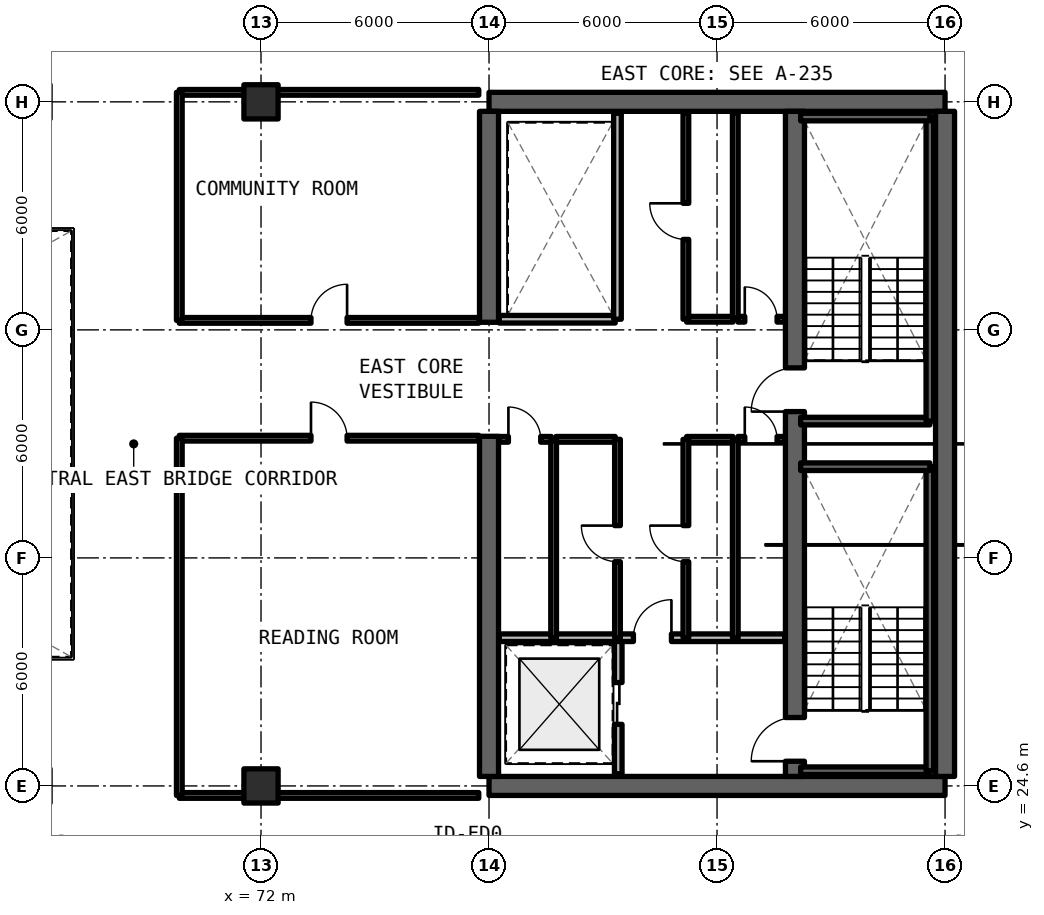
"""IFC4 building model, lengths in metres.
Left out: names, types, materials, properties, quantities, classifications, styles, units other than length and angle.
Written with IfcOpenShell. Run it as: python <this file> out.ifc"""

import sys

from ifc_helpers import new_model, si_unit, direction, frame, frame_2d, origin, origin_2d, place, context, subcontext, project, spatial, rectangle, extrude, element, fill, save


model = new_model("IFC4")
c1 = context("Model", 3, precision=1e-05, world=origin(), true_north=direction((0.0, 1.0)))
c2 = subcontext(c1, "Body", "Model", "MODEL_VIEW")
j1 = project(units=[si_unit("LENGTHUNIT", "METRE"), si_unit("PLANEANGLEUNIT", "RADIAN")], contexts=[c1])
p1 = place(None, origin())
s1 = spatial("IfcSite", under=j1, at=p1, CompositionType="ELEMENT")
p2 = place(p1, origin())
s2 = spatial("IfcBuilding", under=s1, at=p2, CompositionType="ELEMENT")
p3 = place(p2, frame((0.0, 0.0, 151.8)))
s3 = spatial("IfcBuildingStorey", under=s2, at=p3, CompositionType="ELEMENT", Elevation=151.8)
for number, where, z_axis, x_axis in (
    (1, (78.0, 24.6, 0.0), (0.0, 0.0, 1.0), (1.0, 0.0, 0.0)),
    (2, (90.0, 42.6, 0.0), (0.0, 0.0, 1.0), (-1.0, 0.0, 0.0)),
):
    element("IfcWall", number, at=place(p3, frame(where, z_axis=z_axis, x_axis=x_axis)), inside=s3, PredefinedType="SHEAR", context=c2, shape_type="SweptSolid", body=[
        extrude(rectangle(XDim=12.0, YDim=0.5, at=frame_2d((6.0, 0.0))), origin(), (0.0, 0.0, 1.0), 3.3),
    ])
p4 = place(p3, frame((90.0, 24.85, 0.0), z_axis=(0.0, 0.0, 1.0), x_axis=(0.0, 1.0, 0.0)))
e3 = element("IfcWall", 3, at=p4, inside=s3, PredefinedType="SHEAR", context=c2, shape_type="SweptSolid", body=[
    extrude(rectangle(XDim=17.5, YDim=0.5, at=frame_2d((8.75, 0.0))), origin(), (0.0, 0.0, 1.0), 3.3),
])
p5 = place(p3, frame((78.0, 24.85, 0.0), z_axis=(0.0, 0.0, 1.0), x_axis=(0.0, 1.0, 0.0)))
e4 = element("IfcWall", 4, at=p5, inside=s3, PredefinedType="SHEAR", context=c2, shape_type="SweptSolid", body=[
    extrude(rectangle(XDim=8.95, YDim=0.5, at=frame_2d((4.475, 0.0))), origin(), (0.0, 0.0, 1.0), 3.3),
])
p6 = place(p3, frame((78.0, 36.8, 0.0), z_axis=(0.0, 0.0, 1.0), x_axis=(0.0, 1.0, 0.0)))
e5 = element("IfcWall", 5, at=p6, inside=s3, PredefinedType="SHEAR", context=c2, shape_type="SweptSolid", body=[
    extrude(rectangle(XDim=5.55, YDim=0.5, at=frame_2d((2.775, 0.0))), origin(), (0.0, 0.0, 1.0), 3.3),
])
p7 = place(p3, frame((86.05, 24.85, 0.0), z_axis=(0.0, 0.0, 1.0), x_axis=(0.0, 1.0, 0.0)))
e6 = element("IfcWall", 6, at=p7, inside=s3, PredefinedType="SHEAR", context=c2, shape_type="SweptSolid", body=[
    extrude(rectangle(XDim=17.5, YDim=0.5, at=frame_2d((8.75, 0.0))), origin(), (0.0, 0.0, 1.0), 3.3),
])
p8 = place(p7, frame((0.4, 0.0, 0.0)))
e7 = element("IfcOpeningElement", 7, at=p8, cuts=e6, PredefinedType="OPENING", context=c2, shape_type="SweptSolid", body=[
    extrude(rectangle(XDim=1.15, YDim=2.15, at=frame_2d((0.575, 1.075))), frame((0.0, 0.26, 0.0), z_axis=(0.0, -1.0, 0.0), x_axis=(1.0, 0.0, 0.0)), (0.0, 0.0, 1.0), 0.52),
])
p9 = place(p7, frame((9.6, 0.0, 0.0)))
e8 = element("IfcOpeningElement", 8, at=p9, cuts=e6, PredefinedType="OPENING", context=c2, shape_type="SweptSolid", body=[
    extrude(rectangle(XDim=1.15, YDim=2.15, at=frame_2d((0.575, 1.075))), frame((0.0, 0.26, 0.0), z_axis=(0.0, -1.0, 0.0), x_axis=(1.0, 0.0, 0.0)), (0.0, 0.0, 1.0), 0.52),
])
for number, where, z_axis, x_axis in (
    (9, (72.0, 24.6, 0.0), (0.0, 0.0, 1.0), (1.0, 0.0, 0.0)),
    (10, (72.0, 42.6, 0.0), (0.0, 0.0, 1.0), (1.0, 0.0, 0.0)),
):
    element("IfcColumn", number, at=place(p3, frame(where, z_axis=z_axis, x_axis=x_axis)), inside=s3, PredefinedType="COLUMN", context=c2, shape_type="SweptSolid", body=[
        extrude(rectangle(XDim=0.9, YDim=0.9, at=origin_2d()), origin(), (0.0, 0.0, 1.0), 3.3),
    ])
p10 = place(p3, frame((81.4, 24.92, 0.0), z_axis=(0.0, 0.0, 1.0), x_axis=(0.0, 1.0, 0.0)))
e11 = element("IfcWall", 11, at=p10, inside=s3, PredefinedType="SOLIDWALL", context=c2, shape_type="SweptSolid", body=[
    extrude(rectangle(XDim=3.58, YDim=0.2, at=frame_2d((1.79, 0.0))), origin(), (0.0, 0.0, 1.0), 2.35),
])
p11 = place(p10, frame((1.3, 0.0, 0.0)))
e12 = element("IfcOpeningElement", 12, at=p11, cuts=e11, PredefinedType="OPENING", context=c2, shape_type="SweptSolid", body=[
    extrude(rectangle(XDim=1.1, YDim=2.2, at=frame_2d((0.55, 1.1))), frame((0.0, 0.11, 0.0), z_axis=(0.0, -1.0, 0.0), x_axis=(1.0, 0.0, 0.0)), (0.0, 0.0, 1.0), 0.22),
])
p12 = place(p3, frame((78.27, 28.5, 0.0), z_axis=(0.0, 0.0, 1.0), x_axis=(1.0, 0.0, 0.0)))
e13 = element("IfcWall", 13, at=p12, inside=s3, PredefinedType="SOLIDWALL", context=c2, shape_type="SweptSolid", body=[
    extrude(rectangle(XDim=7.51, YDim=0.2, at=frame_2d((3.755, 0.0))), origin(), (0.0, 0.0, 1.0), 2.35),
])
p13 = place(p12, frame((3.53, 0.0, 0.0)))
e14 = element("IfcOpeningElement", 14, at=p13, cuts=e13, PredefinedType="OPENING", context=c2, shape_type="SweptSolid", body=[
    extrude(rectangle(XDim=1.0, YDim=2.15, at=frame_2d((0.5, 1.075))), frame((0.0, 0.11, 0.0), z_axis=(0.0, -1.0, 0.0), x_axis=(1.0, 0.0, 0.0)), (0.0, 0.0, 1.0), 0.22),
])
p14 = place(p3, frame((84.48, 28.5, 0.0), z_axis=(0.0, 0.0, 1.0), x_axis=(0.0, 1.0, 0.0)))
e15 = element("IfcWall", 15, at=p14, inside=s3, PredefinedType="SOLIDWALL", context=c2, shape_type="SweptSolid", body=[
    extrude(rectangle(XDim=5.22, YDim=0.15, at=frame_2d((2.61, 0.0))), origin(), (0.0, 0.0, 1.0), 2.35),
])
p15 = place(p3, frame((84.55, 33.72, 0.0), z_axis=(0.0, 0.0, 1.0), x_axis=(1.0, 0.0, 0.0)))
e16 = element("IfcWall", 16, at=p15, inside=s3, PredefinedType="SOLIDWALL", context=c2, shape_type="SweptSolid", body=[
    extrude(rectangle(XDim=1.23, YDim=0.15, at=frame_2d((0.615, 0.0))), origin(), (0.0, 0.0, 1.0), 2.35),
])
p16 = place(p15, frame((0.18, 0.0, 0.0)))
e17 = element("IfcOpeningElement", 17, at=p16, cuts=e16, PredefinedType="OPENING", context=c2, shape_type="SweptSolid", body=[
    extrude(rectangle(XDim=0.85, YDim=2.1, at=frame_2d((0.425, 1.05))), frame((0.0, 0.085, 0.0), z_axis=(0.0, -1.0, 0.0), x_axis=(1.0, 0.0, 0.0)), (0.0, 0.0, 1.0), 0.17),
])
p17 = place(p3, frame((83.2, 33.72, 0.0), z_axis=(0.0, 0.0, 1.0), x_axis=(1.0, 0.0, 0.0)))
e18 = element("IfcWall", 18, at=p17, inside=s3, PredefinedType="SOLIDWALL", context=c2, shape_type="SweptSolid", body=[
    extrude(rectangle(XDim=1.22, YDim=0.15, at=frame_2d((0.61, 0.0))), origin(), (0.0, 0.0, 1.0), 2.35),
])
p18 = place(p3, frame((83.18, 28.5, 0.0), z_axis=(0.0, 0.0, 1.0), x_axis=(0.0, 1.0, 0.0)))
e19 = element("IfcWall", 19, at=p18, inside=s3, PredefinedType="SOLIDWALL", context=c2, shape_type="SweptSolid", body=[
    extrude(rectangle(XDim=5.22, YDim=0.15, at=frame_2d((2.61, 0.0))), origin(), (0.0, 0.0, 1.0), 2.35),
])
p19 = place(p18, frame((2.0, 0.0, 0.0)))
e20 = element("IfcOpeningElement", 20, at=p19, cuts=e19, PredefinedType="OPENING", context=c2, shape_type="SweptSolid", body=[
    extrude(rectangle(XDim=0.95, YDim=2.15, at=frame_2d((0.475, 1.075))), frame((0.0, 0.085, 0.0), z_axis=(0.0, -1.0, 0.0), x_axis=(1.0, 0.0, 0.0)), (0.0, 0.0, 1.0), 0.17),
])
p20 = place(p3, frame((79.7, 28.5, 0.0), z_axis=(0.0, 0.0, 1.0), x_axis=(0.0, 1.0, 0.0)))
e21 = element("IfcWall", 21, at=p20, inside=s3, PredefinedType="SOLIDWALL", context=c2, shape_type="SweptSolid", body=[
    extrude(rectangle(XDim=5.22, YDim=0.15, at=frame_2d((2.61, 0.0))), origin(), (0.0, 0.0, 1.0), 2.35),
])
p21 = place(p3, frame((79.76, 33.72, 0.0), z_axis=(0.0, 0.0, 1.0), x_axis=(1.0, 0.0, 0.0)))
e22 = element("IfcWall", 22, at=p21, inside=s3, PredefinedType="SOLIDWALL", context=c2, shape_type="SweptSolid", body=[
    extrude(rectangle(XDim=1.56, YDim=0.15, at=frame_2d((0.78, 0.0))), origin(), (0.0, 0.0, 1.0), 2.35),
])
p22 = place(p3, frame((78.27, 33.72, 0.0), z_axis=(0.0, 0.0, 1.0), x_axis=(1.0, 0.0, 0.0)))
e23 = element("IfcWall", 23, at=p22, inside=s3, PredefinedType="SOLIDWALL", context=c2, shape_type="SweptSolid", body=[
    extrude(rectangle(XDim=1.37, YDim=0.15, at=frame_2d((0.685, 0.0))), origin(), (0.0, 0.0, 1.0), 2.35),
])
p23 = place(p22, frame((0.24, 0.0, 0.0)))
e24 = element("IfcOpeningElement", 24, at=p23, cuts=e23, PredefinedType="OPENING", context=c2, shape_type="SweptSolid", body=[
    extrude(rectangle(XDim=0.85, YDim=2.1, at=frame_2d((0.425, 1.05))), frame((0.0, 0.085, 0.0), z_axis=(0.0, -1.0, 0.0), x_axis=(1.0, 0.0, 0.0)), (0.0, 0.0, 1.0), 0.17),
])
p24 = place(p3, frame((81.38, 28.5, 0.0), z_axis=(0.0, 0.0, 1.0), x_axis=(0.0, 1.0, 0.0)))
e25 = element("IfcWall", 25, at=p24, inside=s3, PredefinedType="SOLIDWALL", context=c2, shape_type="SweptSolid", body=[
    extrude(rectangle(XDim=5.22, YDim=0.15, at=frame_2d((2.61, 0.0))), origin(), (0.0, 0.0, 1.0), 2.35),
])
p25 = place(p24, frame((2.0, 0.0, 0.0)))
e26 = element("IfcOpeningElement", 26, at=p25, cuts=e25, PredefinedType="OPENING", context=c2, shape_type="SweptSolid", body=[
    extrude(rectangle(XDim=0.95, YDim=2.15, at=frame_2d((0.475, 1.075))), frame((0.0, 0.085, 0.0), z_axis=(0.0, -1.0, 0.0), x_axis=(1.0, 0.0, 0.0)), (0.0, 0.0, 1.0), 0.17),
])
p26 = place(p3, frame((84.48, 36.88, 0.0), z_axis=(0.0, 0.0, 1.0), x_axis=(0.0, 1.0, 0.0)))
e27 = element("IfcWall", 27, at=p26, inside=s3, PredefinedType="SOLIDWALL", context=c2, shape_type="SweptSolid", body=[
    extrude(rectangle(XDim=5.42, YDim=0.15, at=frame_2d((2.71, 0.0))), origin(), (0.0, 0.0, 1.0), 2.35),
])
p27 = place(p3, frame((84.55, 36.88, 0.0), z_axis=(0.0, 0.0, 1.0), x_axis=(1.0, 0.0, 0.0)))
e28 = element("IfcWall", 28, at=p27, inside=s3, PredefinedType="SOLIDWALL", context=c2, shape_type="SweptSolid", body=[
    extrude(rectangle(XDim=1.23, YDim=0.15, at=frame_2d((0.615, 0.0))), origin(), (0.0, 0.0, 1.0), 2.35),
])
p28 = place(p27, frame((0.18, 0.0, 0.0)))
e29 = element("IfcOpeningElement", 29, at=p28, cuts=e28, PredefinedType="OPENING", context=c2, shape_type="SweptSolid", body=[
    extrude(rectangle(XDim=0.85, YDim=2.1, at=frame_2d((0.425, 1.05))), frame((0.0, 0.085, 0.0), z_axis=(0.0, -1.0, 0.0), x_axis=(1.0, 0.0, 0.0)), (0.0, 0.0, 1.0), 0.17),
])
p29 = place(p3, frame((83.2, 36.88, 0.0), z_axis=(0.0, 0.0, 1.0), x_axis=(1.0, 0.0, 0.0)))
e30 = element("IfcWall", 30, at=p29, inside=s3, PredefinedType="SOLIDWALL", context=c2, shape_type="SweptSolid", body=[
    extrude(rectangle(XDim=1.22, YDim=0.15, at=frame_2d((0.61, 0.0))), origin(), (0.0, 0.0, 1.0), 2.35),
])
p30 = place(p3, frame((83.18, 36.88, 0.0), z_axis=(0.0, 0.0, 1.0), x_axis=(0.0, 1.0, 0.0)))
e31 = element("IfcWall", 31, at=p30, inside=s3, PredefinedType="SOLIDWALL", context=c2, shape_type="SweptSolid", body=[
    extrude(rectangle(XDim=5.42, YDim=0.15, at=frame_2d((2.71, 0.0))), origin(), (0.0, 0.0, 1.0), 2.35),
])
p31 = place(p30, frame((2.1, 0.0, 0.0)))
e32 = element("IfcOpeningElement", 32, at=p31, cuts=e31, PredefinedType="OPENING", context=c2, shape_type="SweptSolid", body=[
    extrude(rectangle(XDim=0.95, YDim=2.15, at=frame_2d((0.475, 1.075))), frame((0.0, 0.085, 0.0), z_axis=(0.0, -1.0, 0.0), x_axis=(1.0, 0.0, 0.0)), (0.0, 0.0, 1.0), 0.17),
])
p32 = place(p3, frame((78.27, 36.88, 0.0), z_axis=(0.0, 0.0, 1.0), x_axis=(1.0, 0.0, 0.0)))
e33 = element("IfcWall", 33, at=p32, inside=s3, PredefinedType="SOLIDWALL", context=c2, shape_type="SweptSolid", body=[
    extrude(rectangle(XDim=3.05, YDim=0.2, at=frame_2d((1.525, 0.0))), origin(), (0.0, 0.0, 1.0), 2.35),
])
p33 = place(p3, frame((81.38, 36.88, 0.0), z_axis=(0.0, 0.0, 1.0), x_axis=(0.0, 1.0, 0.0)))
e34 = element("IfcWall", 34, at=p33, inside=s3, PredefinedType="SOLIDWALL", context=c2, shape_type="SweptSolid", body=[
    extrude(rectangle(XDim=5.42, YDim=0.2, at=frame_2d((2.71, 0.0))), origin(), (0.0, 0.0, 1.0), 2.35),
])
p34 = place(p3, frame((69.85, 24.35, 0.0), z_axis=(0.0, 0.0, 1.0), x_axis=(1.0, 0.0, 0.0)))
e35 = element("IfcWall", 35, at=p34, inside=s3, PredefinedType="SOLIDWALL", context=c2, shape_type="SweptSolid", body=[
    extrude(rectangle(XDim=7.88, YDim=0.15, at=frame_2d((3.94, 0.0))), origin(), (0.0, 0.0, 1.0), 2.35),
])
p35 = place(p3, frame((69.85, 33.75, 0.0), z_axis=(0.0, 0.0, 1.0), x_axis=(1.0, 0.0, 0.0)))
e36 = element("IfcWall", 36, at=p35, inside=s3, PredefinedType="SOLIDWALL", context=c2, shape_type="SweptSolid", body=[
    extrude(rectangle(XDim=7.88, YDim=0.15, at=frame_2d((3.94, 0.0))), origin(), (0.0, 0.0, 1.0), 2.35),
])
p36 = place(p35, frame((3.465, 0.0, 0.0)))
e37 = element("IfcOpeningElement", 37, at=p36, cuts=e36, PredefinedType="OPENING", context=c2, shape_type="SweptSolid", body=[
    extrude(rectangle(XDim=0.95, YDim=2.15, at=frame_2d((0.475, 1.075))), frame((0.0, 0.085, 0.0), z_axis=(0.0, -1.0, 0.0), x_axis=(1.0, 0.0, 0.0)), (0.0, 0.0, 1.0), 0.17),
])
p37 = place(p3, frame((69.85, 24.35, 0.0), z_axis=(0.0, 0.0, 1.0), x_axis=(0.0, 1.0, 0.0)))
e38 = element("IfcWall", 38, at=p37, inside=s3, PredefinedType="SOLIDWALL", context=c2, shape_type="SweptSolid", body=[
    extrude(rectangle(XDim=9.4, YDim=0.15, at=frame_2d((4.7, 0.0))), origin(), (0.0, 0.0, 1.0), 2.35),
])
p38 = place(p3, frame((69.85, 36.85, 0.0), z_axis=(0.0, 0.0, 1.0), x_axis=(1.0, 0.0, 0.0)))
e39 = element("IfcWall", 39, at=p38, inside=s3, PredefinedType="SOLIDWALL", context=c2, shape_type="SweptSolid", body=[
    extrude(rectangle(XDim=7.88, YDim=0.15, at=frame_2d((3.94, 0.0))), origin(), (0.0, 0.0, 1.0), 2.35),
])
p39 = place(p38, frame((3.465, 0.0, 0.0)))
e40 = element("IfcOpeningElement", 40, at=p39, cuts=e39, PredefinedType="OPENING", context=c2, shape_type="SweptSolid", body=[
    extrude(rectangle(XDim=0.95, YDim=2.15, at=frame_2d((0.475, 1.075))), frame((0.0, 0.085, 0.0), z_axis=(0.0, -1.0, 0.0), x_axis=(1.0, 0.0, 0.0)), (0.0, 0.0, 1.0), 0.17),
])
p40 = place(p3, frame((69.85, 42.85, 0.0), z_axis=(0.0, 0.0, 1.0), x_axis=(1.0, 0.0, 0.0)))
e41 = element("IfcWall", 41, at=p40, inside=s3, PredefinedType="SOLIDWALL", context=c2, shape_type="SweptSolid", body=[
    extrude(rectangle(XDim=7.88, YDim=0.15, at=frame_2d((3.94, 0.0))), origin(), (0.0, 0.0, 1.0), 2.35),
])
p41 = place(p3, frame((69.85, 36.85, 0.0), z_axis=(0.0, 0.0, 1.0), x_axis=(0.0, 1.0, 0.0)))
e42 = element("IfcWall", 42, at=p41, inside=s3, PredefinedType="SOLIDWALL", context=c2, shape_type="SweptSolid", body=[
    extrude(rectangle(XDim=6.0, YDim=0.15, at=frame_2d((3.0, 0.0))), origin(), (0.0, 0.0, 1.0), 2.35),
])
p42 = place(p3, frame((86.2, 25.0, 0.0), z_axis=(0.0, 0.0, 1.0), x_axis=(1.0, 0.0, 0.0)))
e43 = element("IfcWall", 43, at=p42, inside=s3, PredefinedType="SOLIDWALL", context=c2, shape_type="SweptSolid", body=[
    extrude(rectangle(XDim=3.4, YDim=0.2, at=frame_2d((1.7, 0.0))), origin(), (0.0, 0.0, 1.0), 3.3),
])
p43 = place(p3, frame((89.6, 25.0, 0.0), z_axis=(0.0, 0.0, 1.0), x_axis=(0.0, 1.0, 0.0)))
e44 = element("IfcWall", 44, at=p43, inside=s3, PredefinedType="SOLIDWALL", context=c2, shape_type="SweptSolid", body=[
    extrude(rectangle(XDim=8.0, YDim=0.2, at=frame_2d((4.0, 0.0))), origin(), (0.0, 0.0, 1.0), 3.3),
])
for number, where, z_axis, x_axis in (
    (45, (89.6, 33.0, 0.0), (0.0, 0.0, 1.0), (-1.0, 0.0, 0.0)),
    (46, (86.2, 34.2, 0.0), (0.0, 0.0, 1.0), (1.0, 0.0, 0.0)),
):
    element("IfcWall", number, at=place(p3, frame(where, z_axis=z_axis, x_axis=x_axis)), inside=s3, PredefinedType="SOLIDWALL", context=c2, shape_type="SweptSolid", body=[
        extrude(rectangle(XDim=3.4, YDim=0.2, at=frame_2d((1.7, 0.0))), origin(), (0.0, 0.0, 1.0), 3.3),
    ])
p44 = place(p3, frame((89.6, 34.2, 0.0), z_axis=(0.0, 0.0, 1.0), x_axis=(0.0, 1.0, 0.0)))
e47 = element("IfcWall", 47, at=p44, inside=s3, PredefinedType="SOLIDWALL", context=c2, shape_type="SweptSolid", body=[
    extrude(rectangle(XDim=8.0, YDim=0.2, at=frame_2d((4.0, 0.0))), origin(), (0.0, 0.0, 1.0), 3.3),
])
p45 = place(p3, frame((89.6, 42.2, 0.0), z_axis=(0.0, 0.0, 1.0), x_axis=(-1.0, 0.0, 0.0)))
e48 = element("IfcWall", 48, at=p45, inside=s3, PredefinedType="SOLIDWALL", context=c2, shape_type="SweptSolid", body=[
    extrude(rectangle(XDim=3.4, YDim=0.2, at=frame_2d((1.7, 0.0))), origin(), (0.0, 0.0, 1.0), 3.3),
])
p46 = place(p11, origin())
e49 = element("IfcDoor", 49, at=p46, inside=s3, OperationType="SLIDING_TO_LEFT", PredefinedType="DOOR", context=c2, shape_type="SweptSolid", body=[
    extrude(rectangle(XDim=1.1, YDim=2.2, at=frame_2d((0.55, 1.1))), frame((0.0, 0.025, 0.0), z_axis=(0.0, -1.0, 0.0), x_axis=(1.0, 0.0, 0.0)), (0.0, 0.0, 1.0), 0.05),
])
fill(e12, e49)
p47 = place(p13, origin())
e50 = element("IfcDoor", 50, at=p47, inside=s3, OperationType="SINGLE_SWING_RIGHT", PredefinedType="DOOR", context=c2, shape_type="SweptSolid", body=[
    extrude(rectangle(XDim=1.0, YDim=2.15, at=frame_2d((0.5, 1.075))), frame((0.0, 0.025, 0.0), z_axis=(0.0, -1.0, 0.0), x_axis=(1.0, 0.0, 0.0)), (0.0, 0.0, 1.0), 0.05),
])
fill(e14, e50)
p48 = place(p16, origin())
e51 = element("IfcDoor", 51, at=p48, inside=s3, OperationType="SINGLE_SWING_LEFT", PredefinedType="DOOR", context=c2, shape_type="SweptSolid", body=[
    extrude(rectangle(XDim=0.85, YDim=2.1, at=frame_2d((0.425, 1.05))), frame((0.0, 0.025, 0.0), z_axis=(0.0, -1.0, 0.0), x_axis=(1.0, 0.0, 0.0)), (0.0, 0.0, 1.0), 0.05),
])
fill(e17, e51)
p49 = place(p19, origin())
e52 = element("IfcDoor", 52, at=p49, inside=s3, OperationType="SINGLE_SWING_RIGHT", PredefinedType="DOOR", context=c2, shape_type="SweptSolid", body=[
    extrude(rectangle(XDim=0.95, YDim=2.15, at=frame_2d((0.475, 1.075))), frame((0.0, 0.025, 0.0), z_axis=(0.0, -1.0, 0.0), x_axis=(1.0, 0.0, 0.0)), (0.0, 0.0, 1.0), 0.05),
])
fill(e20, e52)
p50 = place(p23, origin())
e53 = element("IfcDoor", 53, at=p50, inside=s3, OperationType="SINGLE_SWING_LEFT", PredefinedType="DOOR", context=c2, shape_type="SweptSolid", body=[
    extrude(rectangle(XDim=0.85, YDim=2.1, at=frame_2d((0.425, 1.05))), frame((0.0, 0.025, 0.0), z_axis=(0.0, -1.0, 0.0), x_axis=(1.0, 0.0, 0.0)), (0.0, 0.0, 1.0), 0.05),
])
fill(e24, e53)
p51 = place(p25, origin())
e54 = element("IfcDoor", 54, at=p51, inside=s3, OperationType="SINGLE_SWING_RIGHT", PredefinedType="DOOR", context=c2, shape_type="SweptSolid", body=[
    extrude(rectangle(XDim=0.95, YDim=2.15, at=frame_2d((0.475, 1.075))), frame((0.0, 0.025, 0.0), z_axis=(0.0, -1.0, 0.0), x_axis=(1.0, 0.0, 0.0)), (0.0, 0.0, 1.0), 0.05),
])
fill(e26, e54)
p52 = place(p28, origin())
e55 = element("IfcDoor", 55, at=p52, inside=s3, OperationType="SINGLE_SWING_LEFT", PredefinedType="DOOR", context=c2, shape_type="SweptSolid", body=[
    extrude(rectangle(XDim=0.85, YDim=2.1, at=frame_2d((0.425, 1.05))), frame((0.0, 0.025, 0.0), z_axis=(0.0, -1.0, 0.0), x_axis=(1.0, 0.0, 0.0)), (0.0, 0.0, 1.0), 0.05),
])
fill(e29, e55)
p53 = place(p31, origin())
e56 = element("IfcDoor", 56, at=p53, inside=s3, OperationType="SINGLE_SWING_RIGHT", PredefinedType="DOOR", context=c2, shape_type="SweptSolid", body=[
    extrude(rectangle(XDim=0.95, YDim=2.15, at=frame_2d((0.475, 1.075))), frame((0.0, 0.025, 0.0), z_axis=(0.0, -1.0, 0.0), x_axis=(1.0, 0.0, 0.0)), (0.0, 0.0, 1.0), 0.05),
])
fill(e32, e56)
p54 = place(p36, origin())
e57 = element("IfcDoor", 57, at=p54, inside=s3, OperationType="SINGLE_SWING_LEFT", PredefinedType="DOOR", context=c2, shape_type="SweptSolid", body=[
    extrude(rectangle(XDim=0.95, YDim=2.15, at=frame_2d((0.475, 1.075))), frame((0.0, 0.025, 0.0), z_axis=(0.0, -1.0, 0.0), x_axis=(1.0, 0.0, 0.0)), (0.0, 0.0, 1.0), 0.05),
])
fill(e37, e57)
p55 = place(p39, origin())
e58 = element("IfcDoor", 58, at=p55, inside=s3, OperationType="SINGLE_SWING_RIGHT", PredefinedType="DOOR", context=c2, shape_type="SweptSolid", body=[
    extrude(rectangle(XDim=0.95, YDim=2.15, at=frame_2d((0.475, 1.075))), frame((0.0, 0.025, 0.0), z_axis=(0.0, -1.0, 0.0), x_axis=(1.0, 0.0, 0.0)), (0.0, 0.0, 1.0), 0.05),
])
fill(e40, e58)
p56 = place(p8, origin())
e59 = element("IfcDoor", 59, at=p56, inside=s3, OperationType="SINGLE_SWING_RIGHT", PredefinedType="DOOR", context=c2, shape_type="SweptSolid", body=[
    extrude(rectangle(XDim=1.15, YDim=2.15, at=frame_2d((0.575, 1.075))), frame((0.0, 0.025, 0.0), z_axis=(0.0, -1.0, 0.0), x_axis=(1.0, 0.0, 0.0)), (0.0, 0.0, 1.0), 0.05),
])
fill(e7, e59)
p57 = place(p9, origin())
e60 = element("IfcDoor", 60, at=p57, inside=s3, OperationType="SINGLE_SWING_LEFT", PredefinedType="DOOR", context=c2, shape_type="SweptSolid", body=[
    extrude(rectangle(XDim=1.15, YDim=2.15, at=frame_2d((0.575, 1.075))), frame((0.0, 0.025, 0.0), z_axis=(0.0, -1.0, 0.0), x_axis=(1.0, 0.0, 0.0)), (0.0, 0.0, 1.0), 0.05),
])
fill(e8, e60)
save(model, sys.argv[1])
